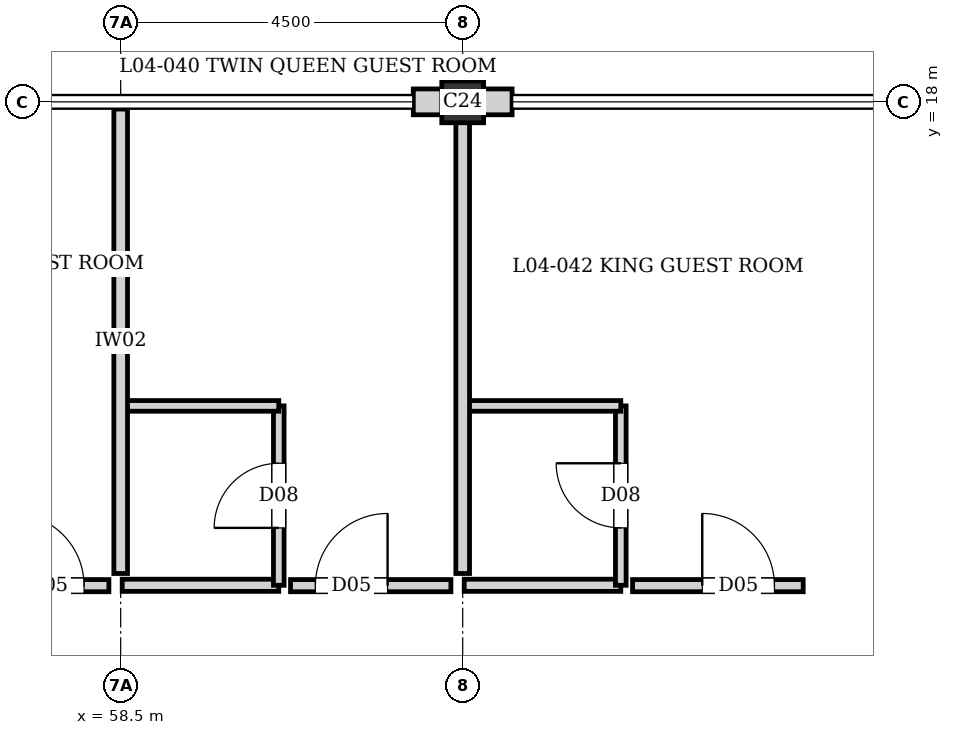
"""IFC4 building model, lengths in metres.
Left out: names, types, materials, properties, quantities, classifications, styles, units other than length and angle.
Written with IfcOpenShell. Run it as: python <this file> out.ifc"""

import sys

from ifc_helpers import new_model, si_unit, direction, frame, frame_2d, origin, origin_2d, place, context, subcontext, project, spatial, rectangle, extrude, element, fill, save


model = new_model("IFC4")
c1 = context("Model", 3, precision=1e-05, world=origin(), true_north=direction((0.0, 1.0)))
c2 = subcontext(c1, "Body", "Model", "MODEL_VIEW")
j1 = project(units=[si_unit("LENGTHUNIT", "METRE"), si_unit("PLANEANGLEUNIT", "RADIAN")], contexts=[c1])
p1 = place(None, origin())
s1 = spatial("IfcSite", under=j1, at=p1, CompositionType="ELEMENT")
p2 = place(p1, origin())
s2 = spatial("IfcBuilding", under=s1, at=p2, CompositionType="ELEMENT")
p3 = place(p2, frame((0.0, 0.0, 14.56)))
s3 = spatial("IfcBuildingStorey", under=s2, at=p3, CompositionType="ELEMENT", Elevation=14.56)
p4 = place(p3, frame((63.0, 18.0, 0.0), z_axis=(0.0, 0.0, 1.0), x_axis=(1.0, 0.0, 0.0)))
e1 = element("IfcColumn", 1, at=p4, inside=s3, PredefinedType="COLUMN", context=c2, shape_type="SweptSolid", body=[
    extrude(rectangle(XDim=0.55, YDim=0.55, at=origin_2d()), origin(), (0.0, 0.0, 1.0), 3.04),
])
p5 = place(p3, frame((62.35, 18.0, 0.0), z_axis=(0.0, 0.0, 1.0), x_axis=(1.0, 0.0, 0.0)))
e2 = element("IfcWall", 2, at=p5, inside=s3, PredefinedType="SOLIDWALL", context=c2, shape_type="SweptSolid", body=[
    extrude(rectangle(XDim=0.65, YDim=0.34, at=frame_2d((0.325, 0.0))), origin(), (0.0, 0.0, 1.0), 2.55),
])
p6 = place(p3, frame((63.0, 18.0, 0.0), z_axis=(0.0, 0.0, 1.0), x_axis=(1.0, 0.0, 0.0)))
e3 = element("IfcWall", 3, at=p6, inside=s3, PredefinedType="SOLIDWALL", context=c2, shape_type="SweptSolid", body=[
    extrude(rectangle(XDim=0.65, YDim=0.34, at=frame_2d((0.325, 0.0))), origin(), (0.0, 0.0, 1.0), 2.48),
])
p7 = place(p3, frame((58.52, 11.64, 0.0), z_axis=(0.0, 0.0, 1.0), x_axis=(1.0, 0.0, 0.0)))
e4 = element("IfcWall", 4, at=p7, inside=s3, PredefinedType="PARTITIONING", context=c2, shape_type="SweptSolid", body=[
    extrude(rectangle(XDim=2.06, YDim=0.16, at=frame_2d((1.03, 0.0))), origin(), (0.0, 0.0, 1.0), 2.82),
])
p8 = place(p3, frame((60.58, 11.64, 0.0), z_axis=(0.0, 0.0, 1.0), x_axis=(0.0, 1.0, 0.0)))
e5 = element("IfcWall", 5, at=p8, inside=s3, PredefinedType="PLUMBINGWALL", context=c2, shape_type="SweptSolid", body=[
    extrude(rectangle(XDim=2.36, YDim=0.14, at=frame_2d((1.18, 0.0))), origin(), (0.0, 0.0, 1.0), 2.82),
])
p9 = place(p8, frame((0.755, 0.0, 0.0)))
e6 = element("IfcOpeningElement", 6, at=p9, cuts=e5, PredefinedType="OPENING", context=c2, shape_type="SweptSolid", body=[
    extrude(rectangle(XDim=0.85, YDim=2.04, at=frame_2d((0.425, 1.02))), frame((0.0, 0.08, 0.0), z_axis=(0.0, -1.0, 0.0), x_axis=(1.0, 0.0, 0.0)), (0.0, 0.0, 1.0), 0.16),
])
p10 = place(p3, frame((58.52, 14.0, 0.0), z_axis=(0.0, 0.0, 1.0), x_axis=(1.0, 0.0, 0.0)))
e7 = element("IfcWall", 7, at=p10, inside=s3, PredefinedType="PLUMBINGWALL", context=c2, shape_type="SweptSolid", body=[
    extrude(rectangle(XDim=2.06, YDim=0.14, at=frame_2d((1.03, 0.0))), origin(), (0.0, 0.0, 1.0), 2.82),
])
p11 = place(p3, frame((63.02, 11.64, 0.0), z_axis=(0.0, 0.0, 1.0), x_axis=(1.0, 0.0, 0.0)))
e8 = element("IfcWall", 8, at=p11, inside=s3, PredefinedType="PARTITIONING", context=c2, shape_type="SweptSolid", body=[
    extrude(rectangle(XDim=2.06, YDim=0.16, at=frame_2d((1.03, 0.0))), origin(), (0.0, 0.0, 1.0), 2.82),
])
p12 = place(p3, frame((65.08, 11.64, 0.0), z_axis=(0.0, 0.0, 1.0), x_axis=(0.0, 1.0, 0.0)))
e9 = element("IfcWall", 9, at=p12, inside=s3, PredefinedType="PLUMBINGWALL", context=c2, shape_type="SweptSolid", body=[
    extrude(rectangle(XDim=2.36, YDim=0.14, at=frame_2d((1.18, 0.0))), origin(), (0.0, 0.0, 1.0), 2.82),
])
p13 = place(p12, frame((0.755, 0.0, 0.0)))
e10 = element("IfcOpeningElement", 10, at=p13, cuts=e9, PredefinedType="OPENING", context=c2, shape_type="SweptSolid", body=[
    extrude(rectangle(XDim=0.85, YDim=2.04, at=frame_2d((0.425, 1.02))), frame((0.0, 0.08, 0.0), z_axis=(0.0, -1.0, 0.0), x_axis=(1.0, 0.0, 0.0)), (0.0, 0.0, 1.0), 0.16),
])
p14 = place(p3, frame((63.02, 14.0, 0.0), z_axis=(0.0, 0.0, 1.0), x_axis=(1.0, 0.0, 0.0)))
e11 = element("IfcWall", 11, at=p14, inside=s3, PredefinedType="PLUMBINGWALL", context=c2, shape_type="SweptSolid", body=[
    extrude(rectangle(XDim=2.06, YDim=0.14, at=frame_2d((1.03, 0.0))), origin(), (0.0, 0.0, 1.0), 2.82),
])
p15 = place(p3, frame((58.5, 11.795, 0.0), z_axis=(0.0, 0.0, 1.0), x_axis=(0.0, 1.0, 0.0)))
e12 = element("IfcWall", 12, at=p15, inside=s3, PredefinedType="PARTITIONING", context=c2, shape_type="SweptSolid", body=[
    extrude(rectangle(XDim=6.11, YDim=0.18, at=frame_2d((3.055, 0.0))), origin(), (0.0, 0.0, 1.0), 2.82),
])
p16 = place(p3, frame((63.0, 11.795, 0.0), z_axis=(0.0, 0.0, 1.0), x_axis=(0.0, 1.0, 0.0)))
e13 = element("IfcWall", 13, at=p16, inside=s3, PredefinedType="PARTITIONING", context=c2, shape_type="SweptSolid", body=[
    extrude(rectangle(XDim=6.03, YDim=0.18, at=frame_2d((3.015, 0.0))), origin(), (0.0, 0.0, 1.0), 2.49),
])
p17 = place(p3, frame((56.235, 11.635, 0.0), z_axis=(0.0, 0.0, 1.0), x_axis=(1.0, 0.0, 0.0)))
e14 = element("IfcWall", 14, at=p17, inside=s3, PredefinedType="PARTITIONING", context=c2, shape_type="SweptSolid", body=[
    extrude(rectangle(XDim=2.11, YDim=0.16, at=frame_2d((1.055, 0.0))), origin(), (0.0, 0.0, 1.0), 2.82),
])
p18 = place(p17, frame((0.833, 0.0, 0.0)))
e15 = element("IfcOpeningElement", 15, at=p18, cuts=e14, PredefinedType="OPENING", context=c2, shape_type="SweptSolid", body=[
    extrude(rectangle(XDim=0.95, YDim=2.15, at=frame_2d((0.475, 1.075))), frame((0.0, 0.09, 0.0), z_axis=(0.0, -1.0, 0.0), x_axis=(1.0, 0.0, 0.0)), (0.0, 0.0, 1.0), 0.18),
])
p19 = place(p3, frame((60.735, 11.635, 0.0), z_axis=(0.0, 0.0, 1.0), x_axis=(1.0, 0.0, 0.0)))
e16 = element("IfcWall", 16, at=p19, inside=s3, PredefinedType="PARTITIONING", context=c2, shape_type="SweptSolid", body=[
    extrude(rectangle(XDim=2.11, YDim=0.16, at=frame_2d((1.055, 0.0))), origin(), (0.0, 0.0, 1.0), 2.82),
])
p20 = place(p19, frame((0.327, 0.0, 0.0)))
e17 = element("IfcOpeningElement", 17, at=p20, cuts=e16, PredefinedType="OPENING", context=c2, shape_type="SweptSolid", body=[
    extrude(rectangle(XDim=0.95, YDim=2.15, at=frame_2d((0.475, 1.075))), frame((0.0, 0.09, 0.0), z_axis=(0.0, -1.0, 0.0), x_axis=(1.0, 0.0, 0.0)), (0.0, 0.0, 1.0), 0.18),
])
p21 = place(p3, frame((65.235, 11.635, 0.0), z_axis=(0.0, 0.0, 1.0), x_axis=(1.0, 0.0, 0.0)))
e18 = element("IfcWall", 18, at=p21, inside=s3, PredefinedType="PARTITIONING", context=c2, shape_type="SweptSolid", body=[
    extrude(rectangle(XDim=2.245, YDim=0.16, at=frame_2d((1.123, 0.0))), origin(), (0.0, 0.0, 1.0), 2.82),
])
p22 = place(p21, frame((0.917, 0.0, 0.0)))
e19 = element("IfcOpeningElement", 19, at=p22, cuts=e18, PredefinedType="OPENING", context=c2, shape_type="SweptSolid", body=[
    extrude(rectangle(XDim=0.95, YDim=2.15, at=frame_2d((0.475, 1.075))), frame((0.0, 0.09, 0.0), z_axis=(0.0, -1.0, 0.0), x_axis=(1.0, 0.0, 0.0)), (0.0, 0.0, 1.0), 0.18),
])
p23 = place(p9, origin())
e20 = element("IfcDoor", 20, at=p23, inside=s3, OperationType="SINGLE_SWING_LEFT", PredefinedType="DOOR", context=c2, shape_type="SweptSolid", body=[
    extrude(rectangle(XDim=0.85, YDim=2.04, at=frame_2d((0.425, 1.02))), frame((0.0, 0.025, 0.0), z_axis=(0.0, -1.0, 0.0), x_axis=(1.0, 0.0, 0.0)), (0.0, 0.0, 1.0), 0.05),
])
fill(e6, e20)
p24 = place(p13, origin())
e21 = element("IfcDoor", 21, at=p24, inside=s3, OperationType="SINGLE_SWING_RIGHT", PredefinedType="DOOR", context=c2, shape_type="SweptSolid", body=[
    extrude(rectangle(XDim=0.85, YDim=2.04, at=frame_2d((0.425, 1.02))), frame((0.0, 0.025, 0.0), z_axis=(0.0, -1.0, 0.0), x_axis=(1.0, 0.0, 0.0)), (0.0, 0.0, 1.0), 0.05),
])
fill(e10, e21)
p25 = place(p18, origin())
e22 = element("IfcDoor", 22, at=p25, inside=s3, OperationType="SINGLE_SWING_LEFT", PredefinedType="DOOR", context=c2, shape_type="SweptSolid", body=[
    extrude(rectangle(XDim=0.95, YDim=2.15, at=frame_2d((0.475, 1.075))), frame((0.0, 0.025, 0.0), z_axis=(0.0, -1.0, 0.0), x_axis=(1.0, 0.0, 0.0)), (0.0, 0.0, 1.0), 0.05),
])
fill(e15, e22)
p26 = place(p20, origin())
e23 = element("IfcDoor", 23, at=p26, inside=s3, OperationType="SINGLE_SWING_RIGHT", PredefinedType="DOOR", context=c2, shape_type="SweptSolid", body=[
    extrude(rectangle(XDim=0.95, YDim=2.15, at=frame_2d((0.475, 1.075))), frame((0.0, 0.025, 0.0), z_axis=(0.0, -1.0, 0.0), x_axis=(1.0, 0.0, 0.0)), (0.0, 0.0, 1.0), 0.05),
])
fill(e17, e23)
p27 = place(p22, origin())
e24 = element("IfcDoor", 24, at=p27, inside=s3, OperationType="SINGLE_SWING_LEFT", PredefinedType="DOOR", context=c2, shape_type="SweptSolid", body=[
    extrude(rectangle(XDim=0.95, YDim=2.15, at=frame_2d((0.475, 1.075))), frame((0.0, 0.025, 0.0), z_axis=(0.0, -1.0, 0.0), x_axis=(1.0, 0.0, 0.0)), (0.0, 0.0, 1.0), 0.05),
])
fill(e19, e24)
save(model, sys.argv[1])
